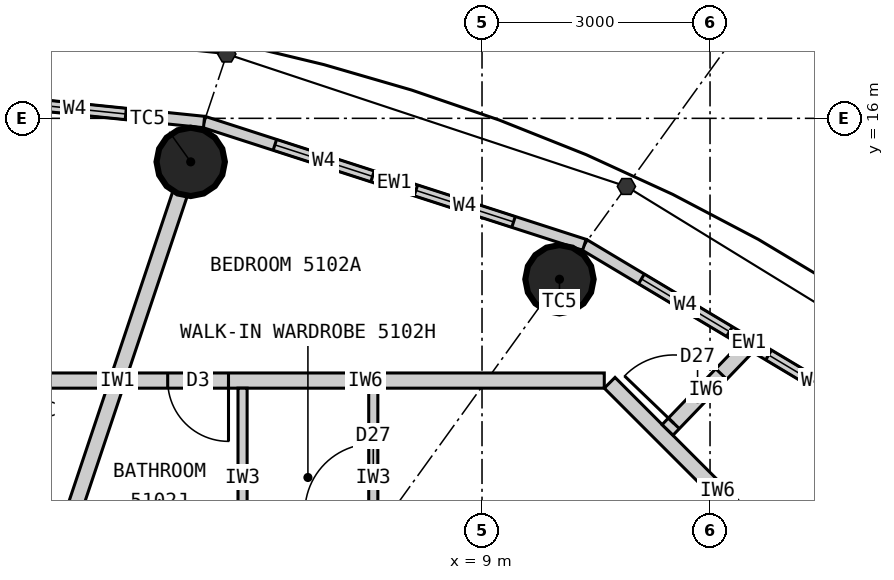
"""IFC4 building model, lengths in metres.
Left out: names, types, materials, properties, quantities, classifications, styles, units other than length and angle.
Written with IfcOpenShell. Run it as: python <this file> out.ifc"""

import sys

from ifc_helpers import new_model, si_unit, direction, frame, frame_2d, origin, origin_2d, place, context, subcontext, project, spatial, rectangle, circle, extrude, element, fill, save


model = new_model("IFC4")
c1 = context("Model", 3, precision=1e-05, world=origin(), true_north=direction((0.0, 1.0)))
c2 = subcontext(c1, "Body", "Model", "MODEL_VIEW")
j1 = project(units=[si_unit("LENGTHUNIT", "METRE"), si_unit("PLANEANGLEUNIT", "RADIAN")], contexts=[c1])
p1 = place(None, origin())
s1 = spatial("IfcSite", under=j1, at=p1, CompositionType="ELEMENT")
p2 = place(p1, origin())
s2 = spatial("IfcBuilding", under=s1, at=p2, CompositionType="ELEMENT")
p3 = place(p2, frame((0.0, 0.0, 192.9)))
s3 = spatial("IfcBuildingStorey", under=s2, at=p3, CompositionType="ELEMENT", Elevation=192.9)
for number, where, z_axis, x_axis in (
    (1, (10.019, 13.883, 0.0), (0.0, 0.0, 1.0), (1.0, 0.0, 0.0)),
    (2, (5.167, 15.427, 0.0), (0.0, 0.0, 1.0), (1.0, 0.0, 0.0)),
):
    element("IfcColumn", number, at=place(p3, frame(where, z_axis=z_axis, x_axis=x_axis)), inside=s3, PredefinedType="COLUMN", context=c2, shape_type="SweptSolid", body=[
        extrude(circle(Radius=0.45, at=origin_2d()), origin(), (0.0, 0.0, 1.0), 3.3),
    ])
p4 = place(p3, frame((14.68, 11.744, 0.0), z_axis=(0.0, 0.0, 1.0), x_axis=(-0.85822150553, 0.513279502265, 0.0)))
e3 = element("IfcWall", 3, at=p4, inside=s3, PredefinedType="ELEMENTEDWALL", context=c2, shape_type="SweptSolid", body=[
    extrude(rectangle(XDim=5.05, YDim=0.15, at=frame_2d((2.525, 0.0))), origin(), (0.0, 0.0, 1.0), 3.12),
])
p5 = place(p4, frame((0.875, 0.0, 0.9)))
e4 = element("IfcOpeningElement", 4, at=p5, cuts=e3, PredefinedType="OPENING", context=c2, shape_type="SweptSolid", body=[
    extrude(rectangle(XDim=1.35, YDim=1.9, at=frame_2d((0.675, 0.95))), frame((0.0, 0.085, 0.0), z_axis=(0.0, -1.0, 0.0), x_axis=(1.0, 0.0, 0.0)), (0.0, 0.0, 1.0), 0.17),
])
p6 = place(p4, frame((2.825, 0.0, 0.9)))
e5 = element("IfcOpeningElement", 5, at=p6, cuts=e3, PredefinedType="OPENING", context=c2, shape_type="SweptSolid", body=[
    extrude(rectangle(XDim=1.35, YDim=1.9, at=frame_2d((0.675, 0.95))), frame((0.0, 0.085, 0.0), z_axis=(0.0, -1.0, 0.0), x_axis=(1.0, 0.0, 0.0)), (0.0, 0.0, 1.0), 0.17),
])
p7 = place(p3, frame((10.346, 14.336, 0.0), z_axis=(0.0, 0.0, 1.0), x_axis=(-0.951644702515, 0.307200846638, 0.0)))
e6 = element("IfcWall", 6, at=p7, inside=s3, PredefinedType="ELEMENTEDWALL", context=c2, shape_type="SweptSolid", body=[
    extrude(rectangle(XDim=5.258, YDim=0.15, at=frame_2d((2.629, 0.0))), origin(), (0.0, 0.0, 1.0), 3.12),
])
p8 = place(p7, frame((0.979, 0.0, 0.9)))
e7 = element("IfcOpeningElement", 7, at=p8, cuts=e6, PredefinedType="OPENING", context=c2, shape_type="SweptSolid", body=[
    extrude(rectangle(XDim=1.35, YDim=1.9, at=frame_2d((0.675, 0.95))), frame((0.0, 0.085, 0.0), z_axis=(0.0, -1.0, 0.0), x_axis=(1.0, 0.0, 0.0)), (0.0, 0.0, 1.0), 0.17),
])
p9 = place(p7, frame((2.929, 0.0, 0.9)))
e8 = element("IfcOpeningElement", 8, at=p9, cuts=e6, PredefinedType="OPENING", context=c2, shape_type="SweptSolid", body=[
    extrude(rectangle(XDim=1.35, YDim=1.9, at=frame_2d((0.675, 0.95))), frame((0.0, 0.085, 0.0), z_axis=(0.0, -1.0, 0.0), x_axis=(1.0, 0.0, 0.0)), (0.0, 0.0, 1.0), 0.17),
])
p10 = place(p3, frame((5.343, 15.952, 0.0), z_axis=(0.0, 0.0, 1.0), x_axis=(-0.994774574972, 0.102095763818, 0.0)))
e9 = element("IfcWall", 9, at=p10, inside=s3, PredefinedType="ELEMENTEDWALL", context=c2, shape_type="SweptSolid", body=[
    extrude(rectangle(XDim=5.371, YDim=0.15, at=frame_2d((2.686, 0.0))), origin(), (0.0, 0.0, 1.0), 3.12),
])
p11 = place(p10, frame((1.035, 0.0, 0.9)))
e10 = element("IfcOpeningElement", 10, at=p11, cuts=e9, PredefinedType="OPENING", context=c2, shape_type="SweptSolid", body=[
    extrude(rectangle(XDim=1.35, YDim=1.9, at=frame_2d((0.675, 0.95))), frame((0.0, 0.085, 0.0), z_axis=(0.0, -1.0, 0.0), x_axis=(1.0, 0.0, 0.0)), (0.0, 0.0, 1.0), 0.17),
])
p12 = place(p10, frame((2.985, 0.0, 0.9)))
e11 = element("IfcOpeningElement", 11, at=p12, cuts=e9, PredefinedType="OPENING", context=c2, shape_type="SweptSolid", body=[
    extrude(rectangle(XDim=1.35, YDim=1.9, at=frame_2d((0.675, 0.95))), frame((0.0, 0.085, 0.0), z_axis=(0.0, -1.0, 0.0), x_axis=(1.0, 0.0, 0.0)), (0.0, 0.0, 1.0), 0.17),
])
p13 = place(p3, frame((3.383, 10.1, 0.0), z_axis=(0.0, 0.0, 1.0), x_axis=(0.317602151035, 0.948224063003, 0.0)))
e12 = element("IfcWall", 12, at=p13, inside=s3, PredefinedType="PARTITIONING", context=c2, shape_type="SweptSolid", body=[
    extrude(rectangle(XDim=5.168, YDim=0.2, at=frame_2d((2.584, 0.0))), origin(), (0.0, 0.0, 1.0), 2.27),
])
p14 = place(p3, frame((13.521, 9.679, 0.0), z_axis=(0.0, 0.0, 1.0), x_axis=(-0.707106781187, 0.707106781187, 0.0)))
e13 = element("IfcWall", 13, at=p14, inside=s3, PredefinedType="PARTITIONING", context=c2, shape_type="SweptSolid", body=[
    extrude(rectangle(XDim=4.019, YDim=0.2, at=frame_2d((2.009, 0.0))), origin(), (0.0, 0.0, 1.0), 3.12),
])
p15 = place(p3, frame((10.609, 12.55, 0.0), z_axis=(0.0, 0.0, 1.0), x_axis=(-1.0, 0.0, 0.0)))
e14 = element("IfcWall", 14, at=p15, inside=s3, PredefinedType="PARTITIONING", context=c2, shape_type="SweptSolid", body=[
    extrude(rectangle(XDim=6.284, YDim=0.2, at=frame_2d((3.142, 0.0))), origin(), (0.0, 0.0, 1.0), 3.12),
])
p16 = place(p15, frame((4.944, 0.0, 0.0)))
e15 = element("IfcOpeningElement", 15, at=p16, cuts=e14, PredefinedType="OPENING", context=c2, shape_type="SweptSolid", body=[
    extrude(rectangle(XDim=0.8, YDim=2.1, at=frame_2d((0.4, 1.05))), frame((0.0, 0.11, 0.0), z_axis=(0.0, -1.0, 0.0), x_axis=(1.0, 0.0, 0.0)), (0.0, 0.0, 1.0), 0.22),
])
p17 = place(p3, frame((11.441, 11.9, 0.0), z_axis=(0.0, 0.0, 1.0), x_axis=(0.692958717259, 0.720977264672, 0.0)))
e16 = element("IfcWall", 16, at=p17, inside=s3, PredefinedType="PARTITIONING", context=c2, shape_type="SweptSolid", body=[
    extrude(rectangle(XDim=1.464, YDim=0.2, at=frame_2d((0.732, 0.0))), origin(), (0.0, 0.0, 1.0), 3.12),
])
p18 = place(p17, frame((0.12, 0.0, 0.0)))
e17 = element("IfcOpeningElement", 17, at=p18, cuts=e16, PredefinedType="OPENING", context=c2, shape_type="SweptSolid", body=[
    extrude(rectangle(XDim=0.9, YDim=2.1, at=frame_2d((0.45, 1.05))), frame((0.0, 0.11, 0.0), z_axis=(0.0, -1.0, 0.0), x_axis=(1.0, 0.0, 0.0)), (0.0, 0.0, 1.0), 0.22),
])
p19 = place(p3, frame((7.569, 10.1, 0.0), z_axis=(0.0, 0.0, 1.0), x_axis=(0.0, 1.0, 0.0)))
e18 = element("IfcWall", 18, at=p19, inside=s3, PredefinedType="PARTITIONING", context=c2, shape_type="SweptSolid", body=[
    extrude(rectangle(XDim=2.35, YDim=0.12, at=frame_2d((1.175, 0.0))), origin(), (0.0, 0.0, 1.0), 3.12),
])
p20 = place(p19, frame((0.72, 0.0, 0.0)))
e19 = element("IfcOpeningElement", 19, at=p20, cuts=e18, PredefinedType="OPENING", context=c2, shape_type="SweptSolid", body=[
    extrude(rectangle(XDim=0.9, YDim=2.1, at=frame_2d((0.45, 1.05))), frame((0.0, 0.07, 0.0), z_axis=(0.0, -1.0, 0.0), x_axis=(1.0, 0.0, 0.0)), (0.0, 0.0, 1.0), 0.14),
])
p21 = place(p3, frame((5.849, 10.1, 0.0), z_axis=(0.0, 0.0, 1.0), x_axis=(0.0, 1.0, 0.0)))
e20 = element("IfcWall", 20, at=p21, inside=s3, PredefinedType="PARTITIONING", context=c2, shape_type="SweptSolid", body=[
    extrude(rectangle(XDim=2.35, YDim=0.12, at=frame_2d((1.175, 0.0))), origin(), (0.0, 0.0, 1.0), 3.12),
])
p22 = place(p3, frame((4.082, 12.55, 0.0), z_axis=(0.0, 0.0, 1.0), x_axis=(-1.0, 0.0, 0.0)))
e21 = element("IfcWall", 21, at=p22, inside=s3, PredefinedType="PARTITIONING", context=c2, shape_type="SweptSolid", body=[
    extrude(rectangle(XDim=10.446, YDim=0.2, at=frame_2d((5.223, 0.0))), origin(), (0.0, 0.0, 1.0), 3.12),
])
p23 = place(p22, frame((6.757, 0.0, 0.0)))
e22 = element("IfcOpeningElement", 22, at=p23, cuts=e21, PredefinedType="OPENING", context=c2, shape_type="SweptSolid", body=[
    extrude(rectangle(XDim=0.8, YDim=2.1, at=frame_2d((0.4, 1.05))), frame((0.0, 0.11, 0.0), z_axis=(0.0, -1.0, 0.0), x_axis=(1.0, 0.0, 0.0)), (0.0, 0.0, 1.0), 0.22),
])
p24 = place(p22, frame((3.372, 0.0, 0.0)))
e23 = element("IfcOpeningElement", 23, at=p24, cuts=e21, PredefinedType="OPENING", context=c2, shape_type="SweptSolid", body=[
    extrude(rectangle(XDim=0.9, YDim=2.1, at=frame_2d((0.45, 1.05))), frame((0.0, 0.11, 0.0), z_axis=(0.0, -1.0, 0.0), x_axis=(1.0, 0.0, 0.0)), (0.0, 0.0, 1.0), 0.22),
])
p25 = place(p5, origin())
e24 = element("IfcWindow", 24, at=p25, inside=s3, PartitioningType="SINGLE_PANEL", PredefinedType="WINDOW", context=c2, shape_type="SweptSolid", body=[
    extrude(rectangle(XDim=1.35, YDim=1.9, at=frame_2d((0.675, 0.95))), frame((0.0, 0.03, 0.0), z_axis=(0.0, -1.0, 0.0), x_axis=(1.0, 0.0, 0.0)), (0.0, 0.0, 1.0), 0.06),
])
fill(e4, e24)
p26 = place(p6, origin())
e25 = element("IfcWindow", 25, at=p26, inside=s3, PartitioningType="SINGLE_PANEL", PredefinedType="WINDOW", context=c2, shape_type="SweptSolid", body=[
    extrude(rectangle(XDim=1.35, YDim=1.9, at=frame_2d((0.675, 0.95))), frame((0.0, 0.03, 0.0), z_axis=(0.0, -1.0, 0.0), x_axis=(1.0, 0.0, 0.0)), (0.0, 0.0, 1.0), 0.06),
])
fill(e5, e25)
p27 = place(p8, origin())
e26 = element("IfcWindow", 26, at=p27, inside=s3, PartitioningType="SINGLE_PANEL", PredefinedType="WINDOW", context=c2, shape_type="SweptSolid", body=[
    extrude(rectangle(XDim=1.35, YDim=1.9, at=frame_2d((0.675, 0.95))), frame((0.0, 0.03, 0.0), z_axis=(0.0, -1.0, 0.0), x_axis=(1.0, 0.0, 0.0)), (0.0, 0.0, 1.0), 0.06),
])
fill(e7, e26)
p28 = place(p9, origin())
e27 = element("IfcWindow", 27, at=p28, inside=s3, PartitioningType="SINGLE_PANEL", PredefinedType="WINDOW", context=c2, shape_type="SweptSolid", body=[
    extrude(rectangle(XDim=1.35, YDim=1.9, at=frame_2d((0.675, 0.95))), frame((0.0, 0.03, 0.0), z_axis=(0.0, -1.0, 0.0), x_axis=(1.0, 0.0, 0.0)), (0.0, 0.0, 1.0), 0.06),
])
fill(e8, e27)
p29 = place(p11, origin())
e28 = element("IfcWindow", 28, at=p29, inside=s3, PartitioningType="SINGLE_PANEL", PredefinedType="WINDOW", context=c2, shape_type="SweptSolid", body=[
    extrude(rectangle(XDim=1.35, YDim=1.9, at=frame_2d((0.675, 0.95))), frame((0.0, 0.03, 0.0), z_axis=(0.0, -1.0, 0.0), x_axis=(1.0, 0.0, 0.0)), (0.0, 0.0, 1.0), 0.06),
])
fill(e10, e28)
p30 = place(p20, origin())
e29 = element("IfcDoor", 29, at=p30, inside=s3, OperationType="SINGLE_SWING_LEFT", PredefinedType="DOOR", context=c2, shape_type="SweptSolid", body=[
    extrude(rectangle(XDim=0.9, YDim=2.1, at=frame_2d((0.45, 1.05))), frame((0.0, 0.025, 0.0), z_axis=(0.0, -1.0, 0.0), x_axis=(1.0, 0.0, 0.0)), (0.0, 0.0, 1.0), 0.05),
])
fill(e19, e29)
p31 = place(p16, origin())
e30 = element("IfcDoor", 30, at=p31, inside=s3, OperationType="SINGLE_SWING_LEFT", PredefinedType="DOOR", context=c2, shape_type="SweptSolid", body=[
    extrude(rectangle(XDim=0.8, YDim=2.1, at=frame_2d((0.4, 1.05))), frame((0.0, 0.025, 0.0), z_axis=(0.0, -1.0, 0.0), x_axis=(1.0, 0.0, 0.0)), (0.0, 0.0, 1.0), 0.05),
])
fill(e15, e30)
p32 = place(p18, origin())
e31 = element("IfcDoor", 31, at=p32, inside=s3, OperationType="SINGLE_SWING_LEFT", PredefinedType="DOOR", context=c2, shape_type="SweptSolid", body=[
    extrude(rectangle(XDim=0.9, YDim=2.1, at=frame_2d((0.45, 1.05))), frame((0.0, 0.025, 0.0), z_axis=(0.0, -1.0, 0.0), x_axis=(1.0, 0.0, 0.0)), (0.0, 0.0, 1.0), 0.05),
])
fill(e17, e31)
save(model, sys.argv[1])
